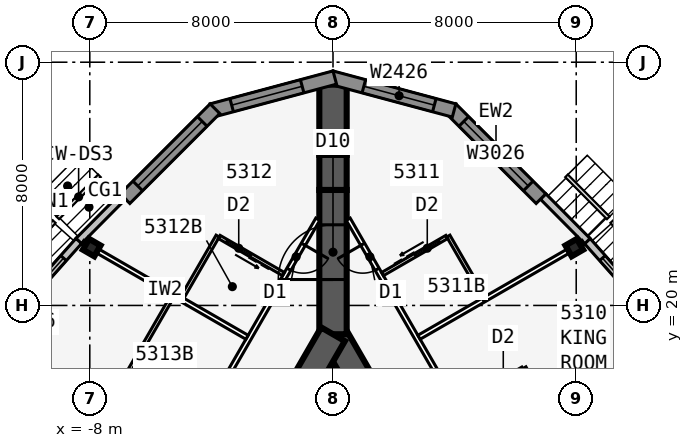
"""IFC4 building model, lengths in metres.
Left out: names, types, materials, properties, quantities, classifications, styles, units other than length and angle.
Written with IfcOpenShell. Run it as: python <this file> out.ifc"""

import sys

from ifc_helpers import new_model, si_unit, direction, frame, frame_2d, origin, origin_2d, place, context, subcontext, project, spatial, polyline, rectangle, i_section, outline, extrude, element, fill, save


model = new_model("IFC4")
c1 = context("Model", 3, precision=1e-05, world=origin(), true_north=direction((0.0, 1.0)))
c2 = subcontext(c1, "Body", "Model", "MODEL_VIEW")
j1 = project(units=[si_unit("LENGTHUNIT", "METRE"), si_unit("PLANEANGLEUNIT", "RADIAN")], contexts=[c1])
p1 = place(None, origin())
s1 = spatial("IfcSite", under=j1, at=p1, CompositionType="ELEMENT")
p2 = place(p1, origin())
s2 = spatial("IfcBuilding", under=s1, at=p2, CompositionType="ELEMENT")
p3 = place(p2, frame((0.0, 0.0, 200.9)))
s3 = spatial("IfcBuildingStorey", under=s2, at=p3, CompositionType="ELEMENT", Elevation=200.9)
p4 = place(p3, frame((16.5, -9.526, 0.0), z_axis=(0.0, 0.0, 1.0), x_axis=(-0.499999749417, 0.866025548458, 0.0)))
e1 = element("IfcWall", 1, at=p4, inside=s3, PredefinedType="SHEAR", context=c2, shape_type="SweptSolid", body=[
    extrude(rectangle(XDim=33.0, YDim=0.9, at=frame_2d((16.5, 0.0))), origin(), (0.0, 0.0, 1.0), 3.6),
])
p5 = place(p4, frame((14.15, 0.0, 0.0)))
e2 = element("IfcOpeningElement", 2, at=p5, cuts=e1, PredefinedType="OPENING", context=c2, shape_type="SweptSolid", body=[
    extrude(rectangle(XDim=1.8, YDim=2.13, at=frame_2d((0.9, 1.065))), frame((0.0, 0.46, 0.0), z_axis=(0.0, -1.0, 0.0), x_axis=(1.0, 0.0, 0.0)), (0.0, 0.0, 1.0), 0.92),
])
p6 = place(p4, frame((12.6, 0.0, 0.0)))
e3 = element("IfcOpeningElement", 3, at=p6, cuts=e1, PredefinedType="OPENING", context=c2, shape_type="SweptSolid", body=[
    extrude(rectangle(XDim=1.0, YDim=2.13, at=frame_2d((0.5, 1.065))), frame((0.0, 0.46, 0.0), z_axis=(0.0, -1.0, 0.0), x_axis=(1.0, 0.0, 0.0)), (0.0, 0.0, 1.0), 0.92),
])
p7 = place(p3, frame((0.0, 19.052, 0.0), z_axis=(0.0, 0.0, 1.0), x_axis=(-0.499999749417, -0.866025548458, 0.0)))
e4 = element("IfcWall", 4, at=p7, inside=s3, PredefinedType="SHEAR", context=c2, shape_type="SweptSolid", body=[
    extrude(rectangle(XDim=33.0, YDim=0.9, at=frame_2d((16.5, 0.0))), origin(), (0.0, 0.0, 1.0), 3.6),
])
p8 = place(p7, frame((14.15, 0.0, 0.0)))
e5 = element("IfcOpeningElement", 5, at=p8, cuts=e4, PredefinedType="OPENING", context=c2, shape_type="SweptSolid", body=[
    extrude(rectangle(XDim=1.8, YDim=2.13, at=frame_2d((0.9, 1.065))), frame((0.0, 0.46, 0.0), z_axis=(0.0, -1.0, 0.0), x_axis=(1.0, 0.0, 0.0)), (0.0, 0.0, 1.0), 0.92),
])
p9 = place(p7, frame((12.6, 0.0, 0.0)))
e6 = element("IfcOpeningElement", 6, at=p9, cuts=e4, PredefinedType="OPENING", context=c2, shape_type="SweptSolid", body=[
    extrude(rectangle(XDim=1.0, YDim=2.13, at=frame_2d((0.5, 1.065))), frame((0.0, 0.46, 0.0), z_axis=(0.0, -1.0, 0.0), x_axis=(1.0, 0.0, 0.0)), (0.0, 0.0, 1.0), 0.92),
])
p10 = place(p3, frame((0.0, 19.052, 0.0), z_axis=(0.0, 0.0, 1.0), x_axis=(0.0, 1.0, 0.0)))
e7 = element("IfcWall", 7, at=p10, inside=s3, PredefinedType="SHEAR", context=c2, shape_type="SweptSolid", body=[
    extrude(rectangle(XDim=4.746, YDim=0.9, at=frame_2d((2.373, 0.0))), origin(), (0.0, 0.0, 1.0), 3.6),
])
p11 = place(p10, frame((1.8, 0.0, 0.0)))
e8 = element("IfcOpeningElement", 8, at=p11, cuts=e7, PredefinedType="OPENING", context=c2, shape_type="SweptSolid", body=[
    extrude(rectangle(XDim=1.8, YDim=2.13, at=frame_2d((0.9, 1.065))), frame((0.0, 0.46, 0.0), z_axis=(0.0, -1.0, 0.0), x_axis=(1.0, 0.0, 0.0)), (0.0, 0.0, 1.0), 0.92),
])
p12 = place(p3, frame((0.0, 23.799, 0.0), z_axis=(0.0, 0.0, 1.0), x_axis=(0.0, 1.0, 0.0)))
e9 = element("IfcWall", 9, at=p12, inside=s3, PredefinedType="SHEAR", context=c2, shape_type="SweptSolid", body=[
    extrude(rectangle(XDim=1.155, YDim=0.9, at=frame_2d((0.577, 0.0))), origin(), (0.0, 0.0, 1.0), 3.6),
])
p13 = place(p3, frame((0.0, 24.953, 0.0), z_axis=(0.0, 0.0, 1.0), x_axis=(0.0, 1.0, 0.0)))
e10 = element("IfcWall", 10, at=p13, inside=s3, PredefinedType="SHEAR", context=c2, shape_type="SweptSolid", body=[
    extrude(rectangle(XDim=2.309, YDim=0.9, at=frame_2d((1.155, 0.0))), origin(), (0.0, 0.0, 1.0), 3.6),
])
for number, where, z_axis, x_axis in (
    (11, (7.937, 21.903, 0.0), (0.0, 0.0, 1.0), (-0.5, 0.866, 0.0)),
    (12, (-7.937, 21.903, 0.0), (0.0, 0.0, 1.0), (-0.5, -0.866, 0.0)),
):
    element("IfcColumn", number, at=place(p3, frame(where, z_axis=z_axis, x_axis=x_axis)), inside=s3, PredefinedType="COLUMN", context=c2, shape_type="SweptSolid", body=[
        extrude(i_section(OverallWidth=0.411, OverallDepth=0.434, WebThickness=0.036, FlangeThickness=0.057, at=origin_2d()), origin(), (0.0, 0.0, 1.0), 3.6),
    ])
p14 = place(p3, frame((11.754, 18.304, 0.0), z_axis=(0.0, 0.0, 1.0), x_axis=(-0.664348996191, 0.747422511876, 0.0)))
e13 = element("IfcWall", 13, at=p14, inside=s3, PredefinedType="STANDARD", context=c2, shape_type="SweptSolid", body=[
    extrude(rectangle(XDim=5.105, YDim=0.25, at=frame_2d((2.552, 0.0))), origin(), (0.0, 0.0, 1.0), 3.435),
])
p15 = place(p14, frame((0.752, 0.0, 0.45)))
e14 = element("IfcOpeningElement", 14, at=p15, cuts=e13, PredefinedType="OPENING", context=c2, shape_type="SweptSolid", body=[
    extrude(rectangle(XDim=3.6, YDim=2.6, at=frame_2d((1.8, 1.3))), frame((0.0, 0.135, 0.0), z_axis=(0.0, -1.0, 0.0), x_axis=(1.0, 0.0, 0.0)), (0.0, 0.0, 1.0), 0.27),
])
p16 = place(p3, frame((8.368, 22.115, 0.0), z_axis=(0.0, 0.0, 1.0), x_axis=(-0.704149946111, 0.710051303352, 0.0)))
e15 = element("IfcWall", 15, at=p16, inside=s3, PredefinedType="STANDARD", context=c2, shape_type="SweptSolid", body=[
    extrude(rectangle(XDim=2.069, YDim=0.25, at=frame_2d((1.034, 0.0))), origin(), (0.0, 0.0, 1.0), 3.435),
])
p17 = place(p3, frame((6.841, 23.512, 0.0), z_axis=(0.0, 0.0, 1.0), x_axis=(-0.707106781187, 0.707106781187, 0.0)))
e16 = element("IfcWall", 16, at=p17, inside=s3, PredefinedType="SOLIDWALL", context=c2, shape_type="SweptSolid", body=[
    extrude(rectangle(XDim=4.184, YDim=0.45, at=frame_2d((2.092, 0.0))), origin(), (0.0, 0.0, 1.0), 3.435),
])
p18 = place(p17, frame((0.592, 0.0, 0.45)))
e17 = element("IfcOpeningElement", 17, at=p18, cuts=e16, PredefinedType="OPENING", context=c2, shape_type="SweptSolid", body=[
    extrude(rectangle(XDim=3.0, YDim=2.6, at=frame_2d((1.5, 1.3))), frame((0.0, 0.235, 0.0), z_axis=(0.0, -1.0, 0.0), x_axis=(1.0, 0.0, 0.0)), (0.0, 0.0, 1.0), 0.47),
])
p19 = place(p3, frame((3.983, 26.413, 0.0), z_axis=(0.0, 0.0, 1.0), x_axis=(-0.965920442324, 0.258839137498, 0.0)))
e18 = element("IfcWall", 18, at=p19, inside=s3, PredefinedType="SOLIDWALL", context=c2, shape_type="SweptSolid", body=[
    extrude(outline(polyline([(4.184, 0.225), (4.124, 0.225), (3.633, 0.093), (3.598, 0.225), (0.0, 0.225), (0.0, -0.225), (4.184, -0.225), (4.184, 0.225)])), origin(), (0.0, 0.0, 1.0), 3.435),
])
p20 = place(p19, frame((0.674, 0.0, 0.45)))
e19 = element("IfcOpeningElement", 19, at=p20, cuts=e18, PredefinedType="OPENING", context=c2, shape_type="SweptSolid", body=[
    extrude(rectangle(XDim=2.4, YDim=2.6, at=frame_2d((1.2, 1.3))), frame((0.0, 0.235, 0.0), z_axis=(0.0, -1.0, 0.0), x_axis=(1.0, 0.0, 0.0)), (0.0, 0.0, 1.0), 0.47),
])
p21 = place(p3, frame((0.058, 27.496, 0.0), z_axis=(0.0, 0.0, 1.0), x_axis=(-0.965920442324, -0.258839137498, 0.0)))
e20 = element("IfcWall", 20, at=p21, inside=s3, PredefinedType="SOLIDWALL", context=c2, shape_type="SweptSolid", body=[
    extrude(outline(polyline([(4.184, 0.225), (0.586, 0.225), (0.551, 0.093), (0.06, 0.225), (0.0, 0.225), (0.0, -0.225), (4.184, -0.225), (4.184, 0.225)])), origin(), (0.0, 0.0, 1.0), 3.435),
])
p22 = place(p21, frame((1.11, 0.0, 0.45)))
e21 = element("IfcOpeningElement", 21, at=p22, cuts=e20, PredefinedType="OPENING", context=c2, shape_type="SweptSolid", body=[
    extrude(rectangle(XDim=2.4, YDim=2.6, at=frame_2d((1.2, 1.3))), frame((0.0, 0.235, 0.0), z_axis=(0.0, -1.0, 0.0), x_axis=(1.0, 0.0, 0.0)), (0.0, 0.0, 1.0), 0.47),
])
p23 = place(p3, frame((-3.882, 26.471, 0.0), z_axis=(0.0, 0.0, 1.0), x_axis=(-0.707106781187, -0.707106781187, 0.0)))
e22 = element("IfcWall", 22, at=p23, inside=s3, PredefinedType="SOLIDWALL", context=c2, shape_type="SweptSolid", body=[
    extrude(rectangle(XDim=4.184, YDim=0.45, at=frame_2d((2.092, 0.0))), origin(), (0.0, 0.0, 1.0), 3.435),
])
p24 = place(p23, frame((0.592, 0.0, 0.45)))
e23 = element("IfcOpeningElement", 23, at=p24, cuts=e22, PredefinedType="OPENING", context=c2, shape_type="SweptSolid", body=[
    extrude(rectangle(XDim=3.0, YDim=2.6, at=frame_2d((1.5, 1.3))), frame((0.0, 0.235, 0.0), z_axis=(0.0, -1.0, 0.0), x_axis=(1.0, 0.0, 0.0)), (0.0, 0.0, 1.0), 0.47),
])
p25 = place(p3, frame((-6.911, 23.583, 0.0), z_axis=(0.0, 0.0, 1.0), x_axis=(-0.704149946111, -0.710051303352, 0.0)))
e24 = element("IfcWall", 24, at=p25, inside=s3, PredefinedType="STANDARD", context=c2, shape_type="SweptSolid", body=[
    extrude(rectangle(XDim=2.069, YDim=0.25, at=frame_2d((1.034, 0.0))), origin(), (0.0, 0.0, 1.0), 3.435),
])
p26 = place(p3, frame((-8.363, 22.12, 0.0), z_axis=(0.0, 0.0, 1.0), x_axis=(-0.664348996191, -0.747422511876, 0.0)))
e25 = element("IfcWall", 25, at=p26, inside=s3, PredefinedType="STANDARD", context=c2, shape_type="SweptSolid", body=[
    extrude(rectangle(XDim=5.105, YDim=0.25, at=frame_2d((2.552, 0.0))), origin(), (0.0, 0.0, 1.0), 3.435),
])
p27 = place(p26, frame((0.752, 0.0, 0.45)))
e26 = element("IfcOpeningElement", 26, at=p27, cuts=e25, PredefinedType="OPENING", context=c2, shape_type="SweptSolid", body=[
    extrude(rectangle(XDim=3.6, YDim=2.6, at=frame_2d((1.8, 1.3))), frame((0.0, 0.135, 0.0), z_axis=(0.0, -1.0, 0.0), x_axis=(1.0, 0.0, 0.0)), (0.0, 0.0, 1.0), 0.27),
])
p28 = place(p3, frame((20.027, -10.985, 0.0), z_axis=(0.0, 0.0, 1.0), x_axis=(-0.500001677587, 0.866024435227, 0.0)))
e27 = element("IfcWall", 27, at=p28, inside=s3, PredefinedType="PARTITIONING", context=c2, shape_type="SweptSolid", body=[
    extrude(rectangle(XDim=39.054, YDim=0.15, at=frame_2d((19.527, 0.0))), origin(), (0.0, 0.0, 1.0), 3.435),
])
p29 = place(p28, frame((1.558, 0.0, 0.0)))
e28 = element("IfcOpeningElement", 28, at=p29, cuts=e27, PredefinedType="OPENING", context=c2, shape_type="SweptSolid", body=[
    extrude(rectangle(XDim=0.95, YDim=2.13, at=frame_2d((0.475, 1.065))), frame((0.0, 0.085, 0.0), z_axis=(0.0, -1.0, 0.0), x_axis=(1.0, 0.0, 0.0)), (0.0, 0.0, 1.0), 0.17),
])
p30 = place(p28, frame((12.752, 0.0, 0.0)))
e29 = element("IfcOpeningElement", 29, at=p30, cuts=e27, PredefinedType="OPENING", context=c2, shape_type="SweptSolid", body=[
    extrude(rectangle(XDim=0.95, YDim=2.13, at=frame_2d((0.475, 1.065))), frame((0.0, 0.085, 0.0), z_axis=(0.0, -1.0, 0.0), x_axis=(1.0, 0.0, 0.0)), (0.0, 0.0, 1.0), 0.17),
])
p31 = place(p28, frame((17.152, 0.0, 0.0)))
e30 = element("IfcOpeningElement", 30, at=p31, cuts=e27, PredefinedType="OPENING", context=c2, shape_type="SweptSolid", body=[
    extrude(rectangle(XDim=0.95, YDim=2.13, at=frame_2d((0.475, 1.065))), frame((0.0, 0.085, 0.0), z_axis=(0.0, -1.0, 0.0), x_axis=(1.0, 0.0, 0.0)), (0.0, 0.0, 1.0), 0.17),
])
p32 = place(p28, frame((22.752, 0.0, 0.0)))
e31 = element("IfcOpeningElement", 31, at=p32, cuts=e27, PredefinedType="OPENING", context=c2, shape_type="SweptSolid", body=[
    extrude(rectangle(XDim=0.95, YDim=2.13, at=frame_2d((0.475, 1.065))), frame((0.0, 0.085, 0.0), z_axis=(0.0, -1.0, 0.0), x_axis=(1.0, 0.0, 0.0)), (0.0, 0.0, 1.0), 0.17),
])
p33 = place(p28, frame((32.152, 0.0, 0.0)))
e32 = element("IfcOpeningElement", 32, at=p33, cuts=e27, PredefinedType="OPENING", context=c2, shape_type="SweptSolid", body=[
    extrude(rectangle(XDim=0.95, YDim=2.13, at=frame_2d((0.475, 1.065))), frame((0.0, 0.085, 0.0), z_axis=(0.0, -1.0, 0.0), x_axis=(1.0, 0.0, 0.0)), (0.0, 0.0, 1.0), 0.17),
])
p34 = place(p28, frame((37.152, 0.0, 0.0)))
e33 = element("IfcOpeningElement", 33, at=p34, cuts=e27, PredefinedType="OPENING", context=c2, shape_type="SweptSolid", body=[
    extrude(rectangle(XDim=0.95, YDim=2.13, at=frame_2d((0.475, 1.065))), frame((0.0, 0.085, 0.0), z_axis=(0.0, -1.0, 0.0), x_axis=(1.0, 0.0, 0.0)), (0.0, 0.0, 1.0), 0.17),
])
p35 = place(p3, frame((5.329, 14.623, 0.0), z_axis=(0.0, 0.0, 1.0), x_axis=(0.866017877653, 0.500013035415, 0.0)))
e34 = element("IfcWall", 34, at=p35, inside=s3, PredefinedType="PARTITIONING", context=c2, shape_type="SweptSolid", body=[
    extrude(rectangle(XDim=7.273, YDim=0.15, at=frame_2d((3.636, 0.0))), origin(), (0.0, 0.0, 1.0), 2.589),
])
p36 = place(p3, frame((2.829, 18.954, 0.0), z_axis=(0.0, 0.0, 1.0), x_axis=(0.866026604282, 0.499997920671, 0.0)))
e35 = element("IfcWall", 35, at=p36, inside=s3, PredefinedType="PARTITIONING", context=c2, shape_type="SweptSolid", body=[
    extrude(rectangle(XDim=6.24, YDim=0.15, at=frame_2d((3.12, 0.0))), origin(), (0.0, 0.0, 1.0), 2.589),
])
p37 = place(p3, frame((7.493, 15.873, 0.0), z_axis=(0.0, 0.0, 1.0), x_axis=(-0.499957262057, 0.866050077142, 0.0)))
e36 = element("IfcWall", 36, at=p37, inside=s3, PredefinedType="PLUMBINGWALL", context=c2, shape_type="SweptSolid", body=[
    extrude(rectangle(XDim=2.4, YDim=0.12, at=frame_2d((1.2, 0.0))), origin(), (0.0, 0.0, 1.0), 3.435),
])
p38 = place(p3, frame((4.128, 16.702, 0.0), z_axis=(0.0, 0.0, 1.0), x_axis=(0.866048967903, 0.499959183527, 0.0)))
e37 = element("IfcWall", 37, at=p38, inside=s3, PredefinedType="PLUMBINGWALL", context=c2, shape_type="SweptSolid", body=[
    extrude(rectangle(XDim=2.44, YDim=0.12, at=frame_2d((1.22, 0.0))), origin(), (0.0, 0.0, 1.0), 3.435),
])
p39 = place(p38, frame((1.25, 0.0, 0.0)))
e38 = element("IfcOpeningElement", 38, at=p39, cuts=e37, PredefinedType="OPENING", context=c2, shape_type="SweptSolid", body=[
    extrude(rectangle(XDim=0.9, YDim=2.13, at=frame_2d((0.45, 1.065))), frame((0.0, 0.07, 0.0), z_axis=(0.0, -1.0, 0.0), x_axis=(1.0, 0.0, 0.0)), (0.0, 0.0, 1.0), 0.14),
])
p40 = place(p3, frame((4.993, 20.204, 0.0), z_axis=(0.0, 0.0, 1.0), x_axis=(-0.500001309137, 0.866024647952, 0.0)))
e39 = element("IfcWall", 39, at=p40, inside=s3, PredefinedType="PLUMBINGWALL", context=c2, shape_type="SweptSolid", body=[
    extrude(rectangle(XDim=2.4, YDim=0.12, at=frame_2d((1.2, 0.0))), origin(), (0.0, 0.0, 1.0), 3.435),
])
p41 = place(p3, frame((1.628, 21.032, 0.0), z_axis=(0.0, 0.0, 1.0), x_axis=(0.866048967903, 0.499959183527, 0.0)))
e40 = element("IfcWall", 40, at=p41, inside=s3, PredefinedType="PLUMBINGWALL", context=c2, shape_type="SweptSolid", body=[
    extrude(rectangle(XDim=2.44, YDim=0.12, at=frame_2d((1.22, 0.0))), origin(), (0.0, 0.0, 1.0), 3.435),
])
p42 = place(p41, frame((1.25, 0.0, 0.0)))
e41 = element("IfcOpeningElement", 41, at=p42, cuts=e40, PredefinedType="OPENING", context=c2, shape_type="SweptSolid", body=[
    extrude(rectangle(XDim=0.9, YDim=2.13, at=frame_2d((0.45, 1.065))), frame((0.0, 0.07, 0.0), z_axis=(0.0, -1.0, 0.0), x_axis=(1.0, 0.0, 0.0)), (0.0, 0.0, 1.0), 0.14),
])
p43 = place(p3, frame((-0.5, 22.836, 0.0), z_axis=(0.0, 0.0, 1.0), x_axis=(-0.500001677587, -0.866024435227, 0.0)))
e42 = element("IfcWall", 42, at=p43, inside=s3, PredefinedType="PARTITIONING", context=c2, shape_type="SweptSolid", body=[
    extrude(rectangle(XDim=39.054, YDim=0.15, at=frame_2d((19.527, 0.0))), origin(), (0.0, 0.0, 1.0), 3.435),
])
p44 = place(p43, frame((0.952, 0.0, 0.0)))
e43 = element("IfcOpeningElement", 43, at=p44, cuts=e42, PredefinedType="OPENING", context=c2, shape_type="SweptSolid", body=[
    extrude(rectangle(XDim=0.95, YDim=2.13, at=frame_2d((0.475, 1.065))), frame((0.0, 0.085, 0.0), z_axis=(0.0, -1.0, 0.0), x_axis=(1.0, 0.0, 0.0)), (0.0, 0.0, 1.0), 0.17),
])
p45 = place(p43, frame((7.752, 0.0, 0.0)))
e44 = element("IfcOpeningElement", 44, at=p45, cuts=e42, PredefinedType="OPENING", context=c2, shape_type="SweptSolid", body=[
    extrude(rectangle(XDim=0.95, YDim=2.13, at=frame_2d((0.475, 1.065))), frame((0.0, 0.085, 0.0), z_axis=(0.0, -1.0, 0.0), x_axis=(1.0, 0.0, 0.0)), (0.0, 0.0, 1.0), 0.17),
])
p46 = place(p43, frame((17.152, 0.0, 0.0)))
e45 = element("IfcOpeningElement", 45, at=p46, cuts=e42, PredefinedType="OPENING", context=c2, shape_type="SweptSolid", body=[
    extrude(rectangle(XDim=0.95, YDim=2.13, at=frame_2d((0.475, 1.065))), frame((0.0, 0.085, 0.0), z_axis=(0.0, -1.0, 0.0), x_axis=(1.0, 0.0, 0.0)), (0.0, 0.0, 1.0), 0.17),
])
p47 = place(p43, frame((26.552, 0.0, 0.0)))
e46 = element("IfcOpeningElement", 46, at=p47, cuts=e42, PredefinedType="OPENING", context=c2, shape_type="SweptSolid", body=[
    extrude(rectangle(XDim=0.95, YDim=2.13, at=frame_2d((0.475, 1.065))), frame((0.0, 0.085, 0.0), z_axis=(0.0, -1.0, 0.0), x_axis=(1.0, 0.0, 0.0)), (0.0, 0.0, 1.0), 0.17),
])
p48 = place(p43, frame((37.152, 0.0, 0.0)))
e47 = element("IfcOpeningElement", 47, at=p48, cuts=e42, PredefinedType="OPENING", context=c2, shape_type="SweptSolid", body=[
    extrude(rectangle(XDim=0.95, YDim=2.13, at=frame_2d((0.475, 1.065))), frame((0.0, 0.085, 0.0), z_axis=(0.0, -1.0, 0.0), x_axis=(1.0, 0.0, 0.0)), (0.0, 0.0, 1.0), 0.17),
])
p49 = place(p3, frame((-2.829, 18.954, 0.0), z_axis=(0.0, 0.0, 1.0), x_axis=(-0.866026604282, 0.499997920671, 0.0)))
e48 = element("IfcWall", 48, at=p49, inside=s3, PredefinedType="PARTITIONING", context=c2, shape_type="SweptSolid", body=[
    extrude(rectangle(XDim=6.24, YDim=0.15, at=frame_2d((3.12, 0.0))), origin(), (0.0, 0.0, 1.0), 2.589),
])
p50 = place(p3, frame((-3.793, 22.282, 0.0), z_axis=(0.0, 0.0, 1.0), x_axis=(-0.500001309137, -0.866024647952, 0.0)))
e49 = element("IfcWall", 49, at=p50, inside=s3, PredefinedType="PLUMBINGWALL", context=c2, shape_type="SweptSolid", body=[
    extrude(rectangle(XDim=2.4, YDim=0.12, at=frame_2d((1.2, 0.0))), origin(), (0.0, 0.0, 1.0), 3.435),
])
p51 = place(p3, frame((-1.628, 21.032, 0.0), z_axis=(0.0, 0.0, 1.0), x_axis=(-0.866048967903, 0.499959183527, 0.0)))
e50 = element("IfcWall", 50, at=p51, inside=s3, PredefinedType="PLUMBINGWALL", context=c2, shape_type="SweptSolid", body=[
    extrude(rectangle(XDim=2.44, YDim=0.12, at=frame_2d((1.22, 0.0))), origin(), (0.0, 0.0, 1.0), 3.435),
])
p52 = place(p51, frame((1.25, 0.0, 0.0)))
e51 = element("IfcOpeningElement", 51, at=p52, cuts=e50, PredefinedType="OPENING", context=c2, shape_type="SweptSolid", body=[
    extrude(rectangle(XDim=0.9, YDim=2.13, at=frame_2d((0.45, 1.065))), frame((0.0, 0.07, 0.0), z_axis=(0.0, -1.0, 0.0), x_axis=(1.0, 0.0, 0.0)), (0.0, 0.0, 1.0), 0.14),
])
p53 = place(p3, frame((-5.253, 20.354, 0.0), z_axis=(0.0, 0.0, 1.0), x_axis=(-0.499990139034, -0.866031096941, 0.0)))
e52 = element("IfcWall", 52, at=p53, inside=s3, PredefinedType="PLUMBINGWALL", context=c2, shape_type="SweptSolid", body=[
    extrude(rectangle(XDim=3.0, YDim=0.12, at=frame_2d((1.5, 0.0))), origin(), (0.0, 0.0, 1.0), 3.435),
])
p54 = place(p15, origin())
e53 = element("IfcWindow", 53, at=p54, inside=s3, PartitioningType="SINGLE_PANEL", PredefinedType="WINDOW", context=c2, shape_type="SweptSolid", body=[
    extrude(rectangle(XDim=3.6, YDim=2.6, at=frame_2d((1.8, 1.3))), frame((0.0, 0.03, 0.0), z_axis=(0.0, -1.0, 0.0), x_axis=(1.0, 0.0, 0.0)), (0.0, 0.0, 1.0), 0.06),
])
fill(e14, e53)
p55 = place(p18, origin())
e54 = element("IfcWindow", 54, at=p55, inside=s3, PartitioningType="SINGLE_PANEL", PredefinedType="WINDOW", context=c2, shape_type="SweptSolid", body=[
    extrude(rectangle(XDim=3.0, YDim=2.6, at=frame_2d((1.5, 1.3))), frame((0.0, 0.03, 0.0), z_axis=(0.0, -1.0, 0.0), x_axis=(1.0, 0.0, 0.0)), (0.0, 0.0, 1.0), 0.06),
])
fill(e17, e54)
p56 = place(p20, origin())
e55 = element("IfcWindow", 55, at=p56, inside=s3, PartitioningType="SINGLE_PANEL", PredefinedType="WINDOW", context=c2, shape_type="SweptSolid", body=[
    extrude(rectangle(XDim=2.4, YDim=2.6, at=frame_2d((1.2, 1.3))), frame((0.0, 0.03, 0.0), z_axis=(0.0, -1.0, 0.0), x_axis=(1.0, 0.0, 0.0)), (0.0, 0.0, 1.0), 0.06),
])
fill(e19, e55)
p57 = place(p22, origin())
e56 = element("IfcWindow", 56, at=p57, inside=s3, PartitioningType="SINGLE_PANEL", PredefinedType="WINDOW", context=c2, shape_type="SweptSolid", body=[
    extrude(rectangle(XDim=2.4, YDim=2.6, at=frame_2d((1.2, 1.3))), frame((0.0, 0.03, 0.0), z_axis=(0.0, -1.0, 0.0), x_axis=(1.0, 0.0, 0.0)), (0.0, 0.0, 1.0), 0.06),
])
fill(e21, e56)
p58 = place(p24, origin())
e57 = element("IfcWindow", 57, at=p58, inside=s3, PartitioningType="SINGLE_PANEL", PredefinedType="WINDOW", context=c2, shape_type="SweptSolid", body=[
    extrude(rectangle(XDim=3.0, YDim=2.6, at=frame_2d((1.5, 1.3))), frame((0.0, 0.03, 0.0), z_axis=(0.0, -1.0, 0.0), x_axis=(1.0, 0.0, 0.0)), (0.0, 0.0, 1.0), 0.06),
])
fill(e23, e57)
p59 = place(p27, origin())
e58 = element("IfcWindow", 58, at=p59, inside=s3, PartitioningType="SINGLE_PANEL", PredefinedType="WINDOW", context=c2, shape_type="SweptSolid", body=[
    extrude(rectangle(XDim=3.6, YDim=2.6, at=frame_2d((1.8, 1.3))), frame((0.0, 0.03, 0.0), z_axis=(0.0, -1.0, 0.0), x_axis=(1.0, 0.0, 0.0)), (0.0, 0.0, 1.0), 0.06),
])
fill(e26, e58)
p60 = place(p42, origin())
e59 = element("IfcDoor", 59, at=p60, inside=s3, OperationType="SLIDING_TO_LEFT", PredefinedType="DOOR", context=c2, shape_type="SweptSolid", body=[
    extrude(rectangle(XDim=0.9, YDim=2.13, at=frame_2d((0.45, 1.065))), frame((0.0, 0.025, 0.0), z_axis=(0.0, -1.0, 0.0), x_axis=(1.0, 0.0, 0.0)), (0.0, 0.0, 1.0), 0.05),
])
fill(e41, e59)
p61 = place(p34, origin())
e60 = element("IfcDoor", 60, at=p61, inside=s3, OperationType="SINGLE_SWING_RIGHT", PredefinedType="DOOR", context=c2, shape_type="SweptSolid", body=[
    extrude(rectangle(XDim=0.95, YDim=2.13, at=frame_2d((0.475, 1.065))), frame((0.0, 0.025, 0.0), z_axis=(0.0, -1.0, 0.0), x_axis=(1.0, 0.0, 0.0)), (0.0, 0.0, 1.0), 0.05),
])
fill(e33, e60)
p62 = place(p52, origin())
e61 = element("IfcDoor", 61, at=p62, inside=s3, OperationType="SLIDING_TO_LEFT", PredefinedType="DOOR", context=c2, shape_type="SweptSolid", body=[
    extrude(rectangle(XDim=0.9, YDim=2.13, at=frame_2d((0.45, 1.065))), frame((0.0, 0.025, 0.0), z_axis=(0.0, -1.0, 0.0), x_axis=(1.0, 0.0, 0.0)), (0.0, 0.0, 1.0), 0.05),
])
fill(e51, e61)
p63 = place(p44, origin())
e62 = element("IfcDoor", 62, at=p63, inside=s3, OperationType="SINGLE_SWING_LEFT", PredefinedType="DOOR", context=c2, shape_type="SweptSolid", body=[
    extrude(rectangle(XDim=0.95, YDim=2.13, at=frame_2d((0.475, 1.065))), frame((0.0, 0.025, 0.0), z_axis=(0.0, -1.0, 0.0), x_axis=(1.0, 0.0, 0.0)), (0.0, 0.0, 1.0), 0.05),
])
fill(e43, e62)
p64 = place(p11, origin())
e63 = element("IfcDoor", 63, at=p64, inside=s3, OperationType="DOUBLE_DOOR_DOUBLE_SWING", PredefinedType="DOOR", context=c2, shape_type="SweptSolid", body=[
    extrude(rectangle(XDim=1.8, YDim=2.13, at=frame_2d((0.9, 1.065))), frame((0.0, 0.025, 0.0), z_axis=(0.0, -1.0, 0.0), x_axis=(1.0, 0.0, 0.0)), (0.0, 0.0, 1.0), 0.05),
])
fill(e8, e63)
save(model, sys.argv[1])
